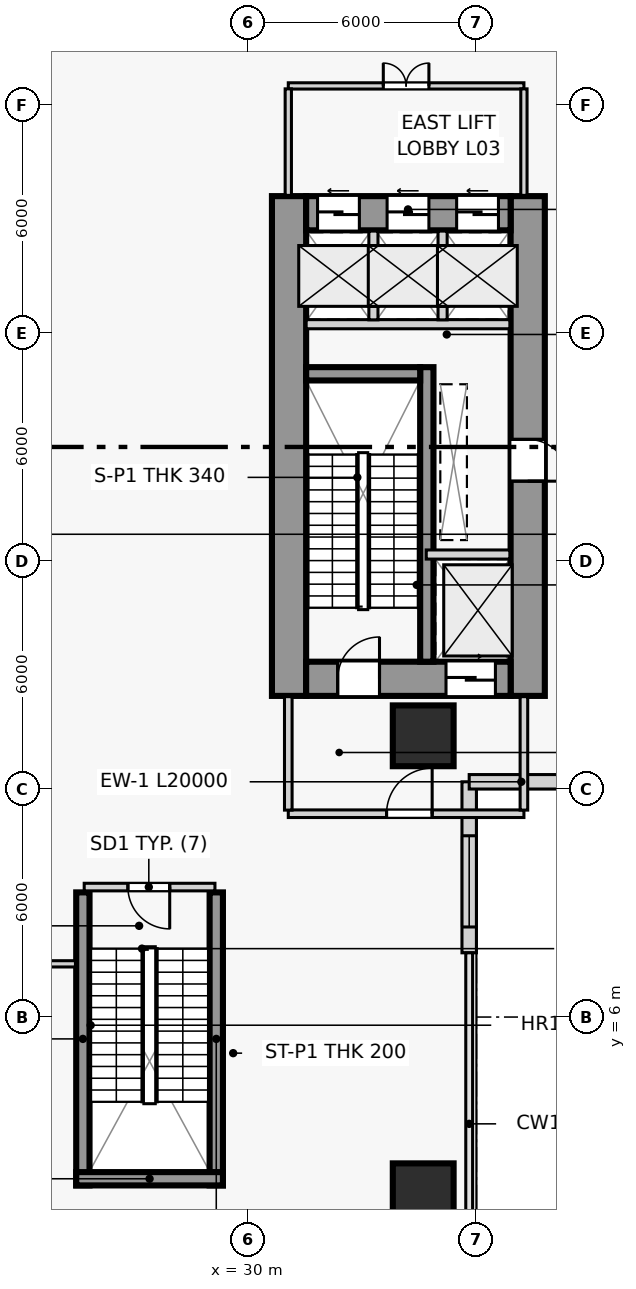
"""IFC4 building model, lengths in metres.
Left out: names, types, materials, properties, quantities, classifications, styles, units other than length and angle.
Written with IfcOpenShell. Run it as: python <this file> out.ifc"""

import sys

from ifc_helpers import new_model, si_unit, direction, frame, frame_2d, origin, origin_2d, place, context, subcontext, project, spatial, rectangle, extrude, source, transform, mapped, element, fill, save


model = new_model("IFC4")
c1 = context("Model", 3, precision=1e-05, world=origin(), true_north=direction((0.0, 1.0)))
c2 = subcontext(c1, "Body", "Model", "MODEL_VIEW")
j1 = project(units=[si_unit("LENGTHUNIT", "METRE"), si_unit("PLANEANGLEUNIT", "RADIAN")], contexts=[c1])
p1 = place(None, origin())
s1 = spatial("IfcSite", under=j1, at=p1, CompositionType="ELEMENT")
p2 = place(p1, origin())
s2 = spatial("IfcBuilding", under=s1, at=p2, CompositionType="ELEMENT")
p3 = place(p2, frame((0.0, 0.0, 13.5)))
s3 = spatial("IfcBuildingStorey", under=s2, at=p3, CompositionType="ELEMENT", Elevation=13.5)
p4 = place(p3, frame((31.07, 14.45, 0.0), z_axis=(0.0, 0.0, 1.0), x_axis=(0.0, 1.0, 0.0)))
e1 = element("IfcWall", 1, at=p4, inside=s3, PredefinedType="SHEAR", context=c2, shape_type="SweptSolid", body=[
    extrude(rectangle(XDim=13.15, YDim=0.9, at=frame_2d((6.575, 0.0))), origin(), (0.0, 0.0, 1.0), 4.5),
])
p5 = place(p3, frame((37.35, 14.45, 0.0), z_axis=(0.0, 0.0, 1.0), x_axis=(0.0, 1.0, 0.0)))
e2 = element("IfcWall", 2, at=p5, inside=s3, PredefinedType="SHEAR", context=c2, shape_type="SweptSolid", body=[
    extrude(rectangle(XDim=13.15, YDim=0.9, at=frame_2d((6.575, 0.0))), origin(), (0.0, 0.0, 1.0), 4.5),
])
p6 = place(p5, frame((5.65, 0.0, 0.0)))
e3 = element("IfcOpeningElement", 3, at=p6, cuts=e2, PredefinedType="OPENING", context=c2, shape_type="SweptSolid", body=[
    extrude(rectangle(XDim=1.1, YDim=2.2, at=frame_2d((0.55, 1.1))), frame((0.0, 0.46, 0.0), z_axis=(0.0, -1.0, 0.0), x_axis=(1.0, 0.0, 0.0)), (0.0, 0.0, 1.0), 0.92),
])
p7 = place(p3, frame((31.52, 14.9, 0.0), z_axis=(0.0, 0.0, 1.0), x_axis=(1.0, 0.0, 0.0)))
e4 = element("IfcWall", 4, at=p7, inside=s3, PredefinedType="SHEAR", context=c2, shape_type="SweptSolid", body=[
    extrude(rectangle(XDim=5.38, YDim=0.9, at=frame_2d((2.69, 0.0))), origin(), (0.0, 0.0, 1.0), 4.5),
])
p8 = place(p7, frame((0.83, 0.0, 0.0)))
e5 = element("IfcOpeningElement", 5, at=p8, cuts=e4, PredefinedType="OPENING", context=c2, shape_type="SweptSolid", body=[
    extrude(rectangle(XDim=1.1, YDim=2.2, at=frame_2d((0.55, 1.1))), frame((0.0, 0.46, 0.0), z_axis=(0.0, -1.0, 0.0), x_axis=(1.0, 0.0, 0.0)), (0.0, 0.0, 1.0), 0.92),
])
p9 = place(p7, frame((3.68, 0.0, 0.0)))
e6 = element("IfcOpeningElement", 6, at=p9, cuts=e4, PredefinedType="OPENING", context=c2, shape_type="SweptSolid", body=[
    extrude(rectangle(XDim=1.3, YDim=2.2, at=frame_2d((0.65, 1.1))), frame((0.0, 0.46, 0.0), z_axis=(0.0, -1.0, 0.0), x_axis=(1.0, 0.0, 0.0)), (0.0, 0.0, 1.0), 0.92),
])
p10 = place(p3, frame((31.52, 27.15, 0.0), z_axis=(0.0, 0.0, 1.0), x_axis=(1.0, 0.0, 0.0)))
e7 = element("IfcWall", 7, at=p10, inside=s3, PredefinedType="SHEAR", context=c2, shape_type="SweptSolid", body=[
    extrude(rectangle(XDim=5.38, YDim=0.9, at=frame_2d((2.69, 0.0))), origin(), (0.0, 0.0, 1.0), 4.5),
])
p11 = place(p10, frame((0.3, 0.0, 0.0)))
e8 = element("IfcOpeningElement", 8, at=p11, cuts=e7, PredefinedType="OPENING", context=c2, shape_type="SweptSolid", body=[
    extrude(rectangle(XDim=1.1, YDim=2.2, at=frame_2d((0.55, 1.1))), frame((0.0, 0.46, 0.0), z_axis=(0.0, -1.0, 0.0), x_axis=(1.0, 0.0, 0.0)), (0.0, 0.0, 1.0), 0.92),
])
p12 = place(p10, frame((2.13, 0.0, 0.0)))
e9 = element("IfcOpeningElement", 9, at=p12, cuts=e7, PredefinedType="OPENING", context=c2, shape_type="SweptSolid", body=[
    extrude(rectangle(XDim=1.1, YDim=2.2, at=frame_2d((0.55, 1.1))), frame((0.0, 0.46, 0.0), z_axis=(0.0, -1.0, 0.0), x_axis=(1.0, 0.0, 0.0)), (0.0, 0.0, 1.0), 0.92),
])
p13 = place(p10, frame((3.96, 0.0, 0.0)))
e10 = element("IfcOpeningElement", 10, at=p13, cuts=e7, PredefinedType="OPENING", context=c2, shape_type="SweptSolid", body=[
    extrude(rectangle(XDim=1.1, YDim=2.2, at=frame_2d((0.55, 1.1))), frame((0.0, 0.46, 0.0), z_axis=(0.0, -1.0, 0.0), x_axis=(1.0, 0.0, 0.0)), (0.0, 0.0, 1.0), 0.92),
])
p14 = place(p3, frame((34.695, 15.35, 0.0), z_axis=(0.0, 0.0, 1.0), x_axis=(0.0, 1.0, 0.0)))
e11 = element("IfcWall", 11, at=p14, inside=s3, PredefinedType="SHEAR", context=c2, shape_type="SweptSolid", body=[
    extrude(rectangle(XDim=7.75, YDim=0.35, at=frame_2d((3.875, 0.0))), origin(), (0.0, 0.0, 1.0), 4.5),
])
p15 = place(p3, frame((31.52, 22.925, 0.0), z_axis=(0.0, 0.0, 1.0), x_axis=(1.0, 0.0, 0.0)))
e12 = element("IfcWall", 12, at=p15, inside=s3, PredefinedType="SHEAR", context=c2, shape_type="SweptSolid", body=[
    extrude(rectangle(XDim=3.0, YDim=0.35, at=frame_2d((1.5, 0.0))), origin(), (0.0, 0.0, 1.0), 4.5),
])
for number, where, z_axis, x_axis in (
    (13, (25.645, 1.57, 0.0), (0.0, 0.0, 1.0), (0.0, 1.0, 0.0)),
    (14, (29.155, 1.57, 0.0), (0.0, 0.0, 1.0), (0.0, 1.0, 0.0)),
):
    element("IfcWall", number, at=place(p3, frame(where, z_axis=z_axis, x_axis=x_axis)), inside=s3, PredefinedType="SHEAR", context=c2, shape_type="SweptSolid", body=[
        extrude(rectangle(XDim=7.71, YDim=0.35, at=frame_2d((3.855, 0.0))), origin(), (0.0, 0.0, 1.0), 4.5),
    ])
p16 = place(p3, frame((25.47, 1.745, 0.0), z_axis=(0.0, 0.0, 1.0), x_axis=(1.0, 0.0, 0.0)))
e15 = element("IfcWall", 15, at=p16, inside=s3, PredefinedType="SHEAR", context=c2, shape_type="SweptSolid", body=[
    extrude(rectangle(XDim=3.86, YDim=0.35, at=frame_2d((1.93, 0.0))), origin(), (0.0, 0.0, 1.0), 4.5),
])
m1 = source(origin(), c2, "Body", "SweptSolid", [
    extrude(rectangle(XDim=1.6, YDim=1.6, at=origin_2d()), origin(), (0.0, 0.0, 1.0), 4.5),
])
for number, where, z_axis, x_axis in (
    (16, (34.6, 1.35, 0.0), (0.0, 0.0, 1.0), (1.0, 0.0, 0.0)),
    (17, (34.6, 13.4, 0.0), (0.0, 0.0, 1.0), (1.0, 0.0, 0.0)),
):
    element("IfcColumn", number, at=place(p3, frame(where, z_axis=z_axis, x_axis=x_axis)), inside=s3, PredefinedType="COLUMN", context=c2, shape_type="MappedRepresentation", body=[
        mapped(m1, transform((0.0, 0.0, 0.0), scale=1.0)),
    ])
p17 = place(p3, frame((35.81, 7.69, 0.0), z_axis=(0.0, 0.0, 1.0), x_axis=(0.0, 1.0, 0.0)))
e18 = element("IfcWall", 18, at=p17, inside=s3, PredefinedType="SOLIDWALL", context=c2, shape_type="SweptSolid", body=[
    extrude(rectangle(XDim=4.5, YDim=0.38, at=frame_2d((2.25, 0.0))), origin(), (0.0, 0.0, 1.0), 4.16),
])
p18 = place(p17, frame((0.68, 0.0, 0.8)))
e19 = element("IfcOpeningElement", 19, at=p18, cuts=e18, PredefinedType="OPENING", context=c2, shape_type="SweptSolid", body=[
    extrude(rectangle(XDim=2.4, YDim=2.1, at=frame_2d((1.2, 1.05))), frame((0.0, 0.2, 0.0), z_axis=(0.0, -1.0, 0.0), x_axis=(1.0, 0.0, 0.0)), (0.0, 0.0, 1.0), 0.4),
])
p19 = place(p3, frame((35.81, 12.19, 0.0), z_axis=(0.0, 0.0, 1.0), x_axis=(1.0, 0.0, 0.0)))
e20 = element("IfcWall", 20, at=p19, inside=s3, PredefinedType="SOLIDWALL", context=c2, shape_type="SweptSolid", body=[
    extrude(rectangle(XDim=20.0, YDim=0.38, at=frame_2d((10.0, 0.0))), origin(), (0.0, 0.0, 1.0), 4.16),
])
p20 = place(p19, frame((2.742, 0.0, 0.8)))
e21 = element("IfcOpeningElement", 21, at=p20, cuts=e20, PredefinedType="OPENING", context=c2, shape_type="SweptSolid", body=[
    extrude(rectangle(XDim=2.4, YDim=2.1, at=frame_2d((1.2, 1.05))), frame((0.0, 0.2, 0.0), z_axis=(0.0, -1.0, 0.0), x_axis=(1.0, 0.0, 0.0)), (0.0, 0.0, 1.0), 0.4),
])
p21 = place(p19, frame((7.228, 0.0, 0.8)))
e22 = element("IfcOpeningElement", 22, at=p21, cuts=e20, PredefinedType="OPENING", context=c2, shape_type="SweptSolid", body=[
    extrude(rectangle(XDim=2.4, YDim=2.1, at=frame_2d((1.2, 1.05))), frame((0.0, 0.2, 0.0), z_axis=(0.0, -1.0, 0.0), x_axis=(1.0, 0.0, 0.0)), (0.0, 0.0, 1.0), 0.4),
])
p22 = place(p19, frame((11.712, 0.0, 0.8)))
e23 = element("IfcOpeningElement", 23, at=p22, cuts=e20, PredefinedType="OPENING", context=c2, shape_type="SweptSolid", body=[
    extrude(rectangle(XDim=2.4, YDim=2.1, at=frame_2d((1.2, 1.05))), frame((0.0, 0.2, 0.0), z_axis=(0.0, -1.0, 0.0), x_axis=(1.0, 0.0, 0.0)), (0.0, 0.0, 1.0), 0.4),
])
p23 = place(p19, frame((16.198, 0.0, 0.8)))
e24 = element("IfcOpeningElement", 24, at=p23, cuts=e20, PredefinedType="OPENING", context=c2, shape_type="SweptSolid", body=[
    extrude(rectangle(XDim=2.4, YDim=2.1, at=frame_2d((1.2, 1.05))), frame((0.0, 0.2, 0.0), z_axis=(0.0, -1.0, 0.0), x_axis=(1.0, 0.0, 0.0)), (0.0, 0.0, 1.0), 0.4),
])
p24 = place(p3, frame((34.68, 18.17, 0.0), z_axis=(0.0, 0.0, 1.0), x_axis=(1.0, 0.0, 0.0)))
e25 = element("IfcWall", 25, at=p24, inside=s3, PredefinedType="PARTITIONING", context=c2, shape_type="SweptSolid", body=[
    extrude(rectangle(XDim=2.2, YDim=0.24, at=frame_2d((1.1, 0.0))), origin(), (0.0, 0.0, 1.0), 4.16),
])
p25 = place(p3, frame((31.05, 11.35, 0.0), z_axis=(0.0, 0.0, 1.0), x_axis=(1.0, 0.0, 0.0)))
e26 = element("IfcWall", 26, at=p25, inside=s3, PredefinedType="PARTITIONING", context=c2, shape_type="SweptSolid", body=[
    extrude(rectangle(XDim=6.2, YDim=0.2, at=frame_2d((3.1, 0.0))), origin(), (0.0, 0.0, 1.0), 4.16),
])
p26 = place(p25, frame((2.586, 0.0, 0.0)))
e27 = element("IfcOpeningElement", 27, at=p26, cuts=e26, PredefinedType="OPENING", context=c2, shape_type="SweptSolid", body=[
    extrude(rectangle(XDim=1.2, YDim=2.2, at=frame_2d((0.6, 1.1))), frame((0.0, 0.11, 0.0), z_axis=(0.0, -1.0, 0.0), x_axis=(1.0, 0.0, 0.0)), (0.0, 0.0, 1.0), 0.22),
])
for number, where, z_axis, x_axis in (
    (28, (31.05, 11.445, 0.0), (0.0, 0.0, 1.0), (0.0, 1.0, 0.0)),
    (29, (37.25, 11.445, 0.0), (0.0, 0.0, 1.0), (0.0, 1.0, 0.0)),
):
    element("IfcWall", number, at=place(p3, frame(where, z_axis=z_axis, x_axis=x_axis)), inside=s3, PredefinedType="PARTITIONING", context=c2, shape_type="SweptSolid", body=[
        extrude(rectangle(XDim=2.985, YDim=0.2, at=frame_2d((1.492, 0.0))), origin(), (0.0, 0.0, 1.0), 4.16),
    ])
p27 = place(p3, frame((31.52, 24.23, 0.0), z_axis=(0.0, 0.0, 1.0), x_axis=(1.0, 0.0, 0.0)))
e30 = element("IfcWall", 30, at=p27, inside=s3, PredefinedType="PARTITIONING", context=c2, shape_type="SweptSolid", body=[
    extrude(rectangle(XDim=5.36, YDim=0.24, at=frame_2d((2.68, 0.0))), origin(), (0.0, 0.0, 1.0), 4.16),
])
for number, where, z_axis, x_axis in (
    (31, (33.29, 24.345, 0.0), (0.0, 0.0, 1.0), (0.0, 1.0, 0.0)),
    (32, (35.11, 24.345, 0.0), (0.0, 0.0, 1.0), (0.0, 1.0, 0.0)),
):
    element("IfcWall", number, at=place(p3, frame(where, z_axis=z_axis, x_axis=x_axis)), inside=s3, PredefinedType="PARTITIONING", context=c2, shape_type="SweptSolid", body=[
        extrude(rectangle(XDim=2.335, YDim=0.24, at=frame_2d((1.167, 0.0))), origin(), (0.0, 0.0, 1.0), 4.16),
    ])
p28 = place(p3, frame((31.05, 30.5, 0.0), z_axis=(0.0, 0.0, 1.0), x_axis=(1.0, 0.0, 0.0)))
e33 = element("IfcWall", 33, at=p28, inside=s3, PredefinedType="PARTITIONING", context=c2, shape_type="SweptSolid", body=[
    extrude(rectangle(XDim=6.2, YDim=0.165, at=frame_2d((3.1, 0.0))), origin(), (0.0, 0.0, 1.0), 4.16),
])
p29 = place(p28, frame((2.5, 0.0, 0.0)))
e34 = element("IfcOpeningElement", 34, at=p29, cuts=e33, PredefinedType="OPENING", context=c2, shape_type="SweptSolid", body=[
    extrude(rectangle(XDim=1.2, YDim=2.2, at=frame_2d((0.6, 1.1))), frame((0.0, 0.093, 0.0), z_axis=(0.0, -1.0, 0.0), x_axis=(1.0, 0.0, 0.0)), (0.0, 0.0, 1.0), 0.185),
])
for number, where, z_axis, x_axis in (
    (35, (31.05, 27.62, 0.0), (0.0, 0.0, 1.0), (0.0, 1.0, 0.0)),
    (36, (37.25, 27.62, 0.0), (0.0, 0.0, 1.0), (0.0, 1.0, 0.0)),
):
    element("IfcWall", number, at=place(p3, frame(where, z_axis=z_axis, x_axis=x_axis)), inside=s3, PredefinedType="PARTITIONING", context=c2, shape_type="SweptSolid", body=[
        extrude(rectangle(XDim=2.802, YDim=0.165, at=frame_2d((1.401, 0.0))), origin(), (0.0, 0.0, 1.0), 4.16),
    ])
p30 = place(p3, frame((25.68, 9.42, 0.0), z_axis=(0.0, 0.0, 1.0), x_axis=(1.0, 0.0, 0.0)))
e37 = element("IfcWall", 37, at=p30, inside=s3, PredefinedType="PARTITIONING", context=c2, shape_type="SweptSolid", body=[
    extrude(rectangle(XDim=3.44, YDim=0.2, at=frame_2d((1.72, 0.0))), origin(), (0.0, 0.0, 1.0), 4.16),
])
p31 = place(p30, frame((1.15, 0.0, 0.0)))
e38 = element("IfcOpeningElement", 38, at=p31, cuts=e37, PredefinedType="OPENING", context=c2, shape_type="SweptSolid", body=[
    extrude(rectangle(XDim=1.1, YDim=2.2, at=frame_2d((0.55, 1.1))), frame((0.0, 0.11, 0.0), z_axis=(0.0, -1.0, 0.0), x_axis=(1.0, 0.0, 0.0)), (0.0, 0.0, 1.0), 0.22),
])
p32 = place(p3, frame((0.185, 7.4, 0.0), z_axis=(0.0, 0.0, 1.0), x_axis=(1.0, 0.0, 0.0)))
e39 = element("IfcWall", 39, at=p32, inside=s3, PredefinedType="PARTITIONING", context=c2, shape_type="SweptSolid", body=[
    extrude(rectangle(XDim=25.265, YDim=0.165, at=frame_2d((12.632, 0.0))), origin(), (0.0, 0.0, 1.0), 4.16),
])
p33 = place(p32, frame((5.14, 0.0, 0.0)))
e40 = element("IfcOpeningElement", 40, at=p33, cuts=e39, PredefinedType="OPENING", context=c2, shape_type="SweptSolid", body=[
    extrude(rectangle(XDim=1.25, YDim=2.2, at=frame_2d((0.625, 1.1))), frame((0.0, 0.093, 0.0), z_axis=(0.0, -1.0, 0.0), x_axis=(1.0, 0.0, 0.0)), (0.0, 0.0, 1.0), 0.185),
])
p34 = place(p32, frame((16.865, 0.0, 0.0)))
e41 = element("IfcOpeningElement", 41, at=p34, cuts=e39, PredefinedType="OPENING", context=c2, shape_type="SweptSolid", body=[
    extrude(rectangle(XDim=1.25, YDim=2.2, at=frame_2d((0.625, 1.1))), frame((0.0, 0.093, 0.0), z_axis=(0.0, -1.0, 0.0), x_axis=(1.0, 0.0, 0.0)), (0.0, 0.0, 1.0), 0.185),
])
m2 = source(origin(), c2, "Body", "SweptSolid", [
    extrude(rectangle(XDim=2.4, YDim=2.1, at=frame_2d((1.2, 1.05))), frame((0.0, 0.03, 0.0), z_axis=(0.0, -1.0, 0.0), x_axis=(1.0, 0.0, 0.0)), (0.0, 0.0, 1.0), 0.06),
])
p35 = place(p18, origin())
e42 = element("IfcWindow", 42, at=p35, inside=s3, PartitioningType="SINGLE_PANEL", PredefinedType="WINDOW", context=c2, shape_type="MappedRepresentation", body=[
    mapped(m2, transform((0.0, 0.0, 0.0), scale=1.0)),
])
fill(e19, e42)
m3 = source(origin(), c2, "Body", "SweptSolid", [
    extrude(rectangle(XDim=1.1, YDim=2.2, at=frame_2d((0.55, 1.1))), frame((0.0, 0.025, 0.0), z_axis=(0.0, -1.0, 0.0), x_axis=(1.0, 0.0, 0.0)), (0.0, 0.0, 1.0), 0.05),
])
p36 = place(p8, origin())
e43 = element("IfcDoor", 43, at=p36, inside=s3, OperationType="SINGLE_SWING_RIGHT", PredefinedType="DOOR", context=c2, shape_type="MappedRepresentation", body=[
    mapped(m3, transform((0.0, 0.0, 0.0), scale=1.0)),
])
fill(e5, e43)
m4 = source(origin(), c2, "Body", "SweptSolid", [
    extrude(rectangle(XDim=1.3, YDim=2.2, at=frame_2d((0.65, 1.1))), frame((0.0, 0.025, 0.0), z_axis=(0.0, -1.0, 0.0), x_axis=(1.0, 0.0, 0.0)), (0.0, 0.0, 1.0), 0.05),
])
p37 = place(p9, origin())
e44 = element("IfcDoor", 44, at=p37, inside=s3, OperationType="SLIDING_TO_RIGHT", PredefinedType="DOOR", context=c2, shape_type="MappedRepresentation", body=[
    mapped(m4, transform((0.0, 0.0, 0.0), scale=1.0)),
])
fill(e6, e44)
m5 = source(origin(), c2, "Body", "SweptSolid", [
    extrude(rectangle(XDim=1.2, YDim=2.2, at=frame_2d((0.6, 1.1))), frame((0.0, 0.025, 0.0), z_axis=(0.0, -1.0, 0.0), x_axis=(1.0, 0.0, 0.0)), (0.0, 0.0, 1.0), 0.05),
])
p38 = place(p26, origin())
e45 = element("IfcDoor", 45, at=p38, inside=s3, OperationType="SINGLE_SWING_RIGHT", PredefinedType="DOOR", context=c2, shape_type="MappedRepresentation", body=[
    mapped(m5, transform((0.0, 0.0, 0.0), scale=1.0)),
])
fill(e27, e45)
m6 = source(origin(), c2, "Body", "SweptSolid", [
    extrude(rectangle(XDim=1.1, YDim=2.2, at=frame_2d((0.55, 1.1))), frame((0.0, 0.025, 0.0), z_axis=(0.0, -1.0, 0.0), x_axis=(1.0, 0.0, 0.0)), (0.0, 0.0, 1.0), 0.05),
])
p39 = place(p11, origin())
e46 = element("IfcDoor", 46, at=p39, inside=s3, OperationType="SLIDING_TO_LEFT", PredefinedType="DOOR", context=c2, shape_type="MappedRepresentation", body=[
    mapped(m6, transform((0.0, 0.0, 0.0), scale=1.0)),
])
fill(e8, e46)
p40 = place(p12, origin())
e47 = element("IfcDoor", 47, at=p40, inside=s3, OperationType="SLIDING_TO_LEFT", PredefinedType="DOOR", context=c2, shape_type="MappedRepresentation", body=[
    mapped(m6, transform((0.0, 0.0, 0.0), scale=1.0)),
])
fill(e9, e47)
p41 = place(p13, origin())
e48 = element("IfcDoor", 48, at=p41, inside=s3, OperationType="SLIDING_TO_LEFT", PredefinedType="DOOR", context=c2, shape_type="MappedRepresentation", body=[
    mapped(m6, transform((0.0, 0.0, 0.0), scale=1.0)),
])
fill(e10, e48)
p42 = place(p29, origin())
e49 = element("IfcDoor", 49, at=p42, inside=s3, OperationType="DOUBLE_DOOR_SINGLE_SWING", PredefinedType="DOOR", context=c2, shape_type="MappedRepresentation", body=[
    mapped(m5, transform((0.0, 0.0, 0.0), scale=1.0)),
])
fill(e34, e49)
p43 = place(p6, frame((1.1, 0.0, 0.0), z_axis=(0.0, 0.0, 1.0), x_axis=(-1.0, 0.0, 0.0)))
e50 = element("IfcDoor", 50, at=p43, inside=s3, OperationType="SINGLE_SWING_RIGHT", PredefinedType="DOOR", context=c2, shape_type="MappedRepresentation", body=[
    mapped(m3, transform((0.0, 0.0, 0.0), scale=1.0)),
])
fill(e3, e50)
p44 = place(p31, frame((1.1, 0.0, 0.0), z_axis=(0.0, 0.0, 1.0), x_axis=(-1.0, 0.0, 0.0)))
e51 = element("IfcDoor", 51, at=p44, inside=s3, OperationType="SINGLE_SWING_LEFT", PredefinedType="DOOR", context=c2, shape_type="MappedRepresentation", body=[
    mapped(m3, transform((0.0, 0.0, 0.0), scale=1.0)),
])
fill(e38, e51)
save(model, sys.argv[1])
